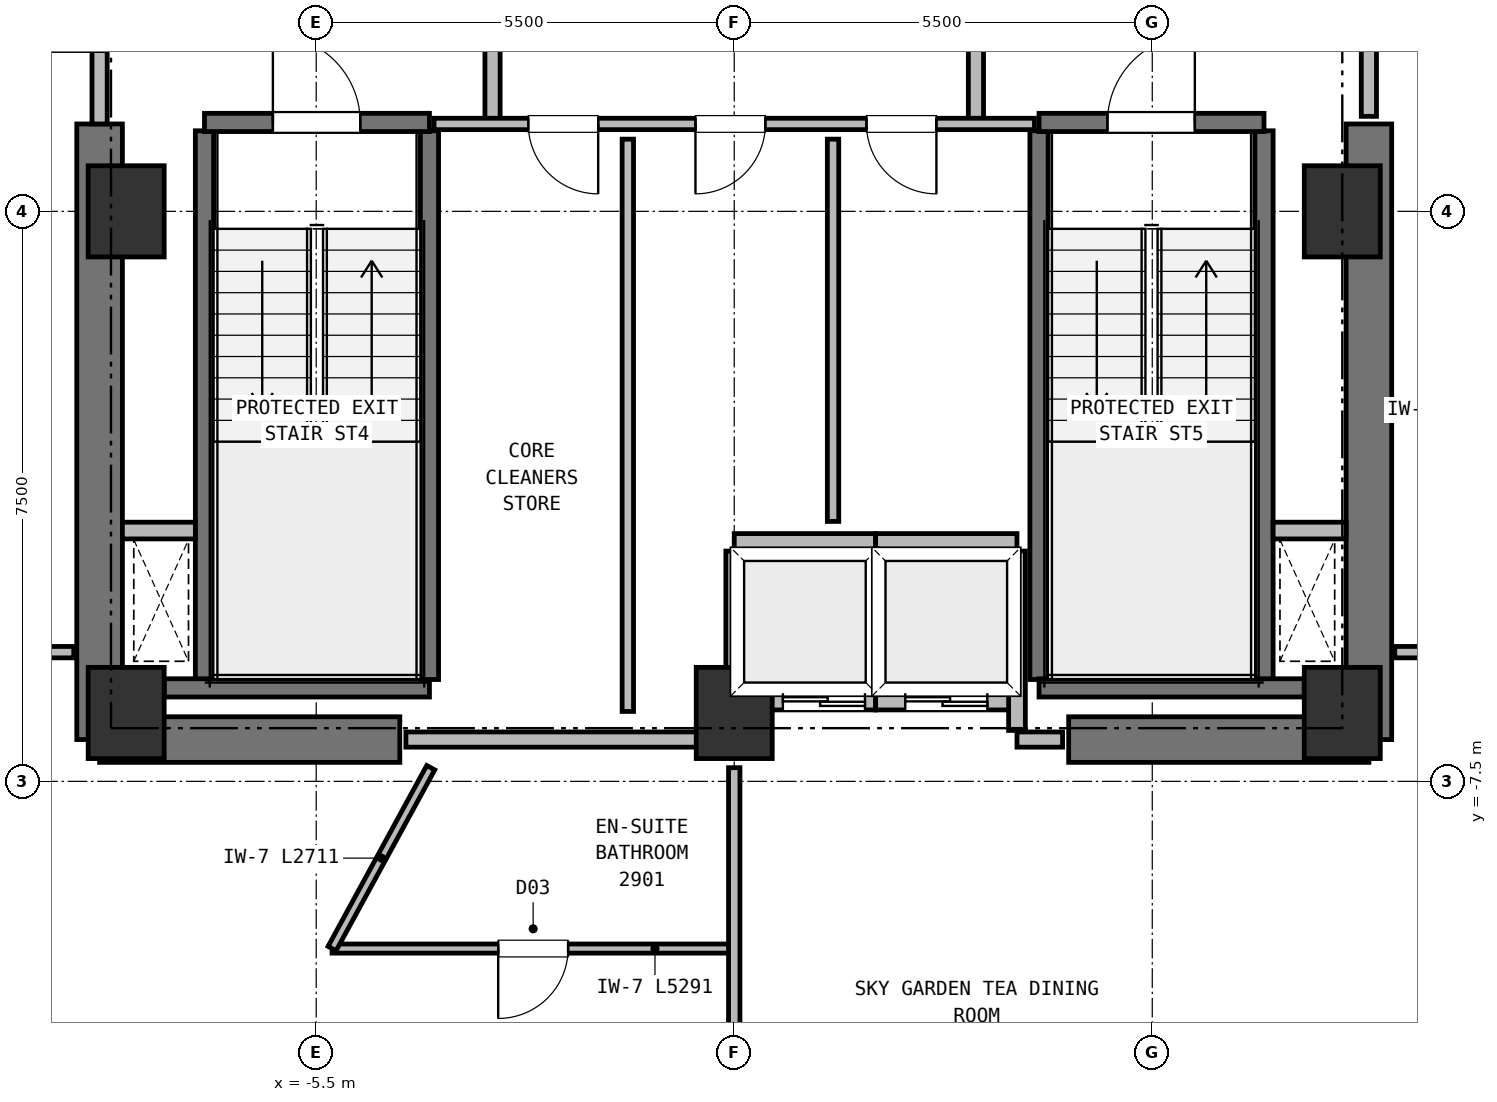
"""IFC4 building model, lengths in metres.
Left out: names, types, materials, properties, quantities, classifications, styles, units other than length and angle.
Written with IfcOpenShell. Run it as: python <this file> out.ifc"""

import sys

from ifc_helpers import new_model, si_unit, direction, frame, frame_2d, origin, origin_2d, place, context, subcontext, project, spatial, rectangle, extrude, element, fill, save


model = new_model("IFC4")
c1 = context("Model", 3, precision=1e-05, world=origin(), true_north=direction((0.0, 1.0)))
c2 = subcontext(c1, "Body", "Model", "MODEL_VIEW")
j1 = project(units=[si_unit("LENGTHUNIT", "METRE"), si_unit("PLANEANGLEUNIT", "RADIAN")], contexts=[c1])
p1 = place(None, origin())
s1 = spatial("IfcSite", under=j1, at=p1, CompositionType="ELEMENT")
p2 = place(p1, origin())
s2 = spatial("IfcBuilding", under=s1, at=p2, CompositionType="ELEMENT")
p3 = place(p2, frame((0.0, 0.0, 108.5)))
s3 = spatial("IfcBuildingStorey", under=s2, at=p3, CompositionType="ELEMENT", Elevation=108.5)
for number, where, z_axis, x_axis in (
    (1, (-8.0, -6.6, 0.0), (0.0, 0.0, 1.0), (1.0, 0.0, 0.0)),
    (2, (0.0, -6.6, 0.0), (0.0, 0.0, 1.0), (1.0, 0.0, 0.0)),
    (3, (8.0, -6.6, 0.0), (0.0, 0.0, 1.0), (1.0, 0.0, 0.0)),
    (4, (8.0, 0.0, 0.0), (0.0, 0.0, 1.0), (1.0, 0.0, 0.0)),
    (5, (-8.0, 0.0, 0.0), (0.0, 0.0, 1.0), (1.0, 0.0, 0.0)),
):
    element("IfcColumn", number, at=place(p3, frame(where, z_axis=z_axis, x_axis=x_axis)), inside=s3, PredefinedType="COLUMN", context=c2, shape_type="SweptSolid", body=[
        extrude(rectangle(XDim=1.0, YDim=1.2, at=origin_2d()), origin(), (0.0, 0.0, 1.0), 3.75),
    ])
for number, where, z_axis, x_axis in (
    (6, (-8.35, -6.95, 0.0), (0.0, 0.0, 1.0), (1.0, 0.0, 0.0)),
    (7, (4.4, -6.95, 0.0), (0.0, 0.0, 1.0), (1.0, 0.0, 0.0)),
):
    element("IfcWall", number, at=place(p3, frame(where, z_axis=z_axis, x_axis=x_axis)), inside=s3, PredefinedType="SHEAR", context=c2, shape_type="SweptSolid", body=[
        extrude(rectangle(XDim=3.95, YDim=0.6, at=frame_2d((1.975, 0.0))), origin(), (0.0, 0.0, 1.0), 3.5),
    ])
for number, where, z_axis, x_axis in (
    (8, (-8.35, -6.95, 0.0), (0.0, 0.0, 1.0), (0.0, 1.0, 0.0)),
    (9, (8.35, -6.95, 0.0), (0.0, 0.0, 1.0), (0.0, 1.0, 0.0)),
):
    element("IfcWall", number, at=place(p3, frame(where, z_axis=z_axis, x_axis=x_axis)), inside=s3, PredefinedType="SHEAR", context=c2, shape_type="SweptSolid", body=[
        extrude(rectangle(XDim=8.1, YDim=0.6, at=frame_2d((4.05, 0.0))), origin(), (0.0, 0.0, 1.0), 3.5),
    ])
p4 = place(p3, frame((11.178, -10.484, 0.0), z_axis=(0.0, 0.0, 1.0), x_axis=(-0.891006889171, -0.453989783419, 0.0)))
e10 = element("IfcWall", 10, at=p4, inside=s3, PredefinedType="SOLIDWALL", context=c2, shape_type="SweptSolid", body=[
    extrude(rectangle(XDim=10.4, YDim=0.36, at=frame_2d((5.2, 0.0))), origin(), (0.0, 0.0, 1.0), 3.15),
])
p5 = place(p4, frame((5.2, 0.0, 0.0)))
e11 = element("IfcOpeningElement", 11, at=p5, cuts=e10, PredefinedType="OPENING", context=c2, shape_type="SweptSolid", body=[
    extrude(rectangle(XDim=1.65, YDim=2.25, at=frame_2d((0.825, 1.125))), frame((0.0, 0.19, 0.0), z_axis=(0.0, -1.0, 0.0), x_axis=(1.0, 0.0, 0.0)), (0.0, 0.0, 1.0), 0.38),
])
p6 = place(p3, frame((-6.97, -6.16, 0.0), z_axis=(0.0, 0.0, 1.0), x_axis=(0.0, 1.0, 0.0)))
e12 = element("IfcWall", 12, at=p6, inside=s3, PredefinedType="SHEAR", context=c2, shape_type="SweptSolid", body=[
    extrude(rectangle(XDim=7.22, YDim=0.24, at=frame_2d((3.61, 0.0))), origin(), (0.0, 0.0, 1.0), 3.5),
])
p7 = place(p3, frame((-7.5, -6.27, 0.0), z_axis=(0.0, 0.0, 1.0), x_axis=(1.0, 0.0, 0.0)))
e13 = element("IfcWall", 13, at=p7, inside=s3, PredefinedType="SHEAR", context=c2, shape_type="SweptSolid", body=[
    extrude(rectangle(XDim=3.49, YDim=0.24, at=frame_2d((1.745, 0.0))), origin(), (0.0, 0.0, 1.0), 3.5),
])
p8 = place(p3, frame((-4.01, -6.16, 0.0), z_axis=(0.0, 0.0, 1.0), x_axis=(0.0, 1.0, 0.0)))
e14 = element("IfcWall", 14, at=p8, inside=s3, PredefinedType="SHEAR", context=c2, shape_type="SweptSolid", body=[
    extrude(rectangle(XDim=7.22, YDim=0.24, at=frame_2d((3.61, 0.0))), origin(), (0.0, 0.0, 1.0), 3.5),
])
p9 = place(p3, frame((-6.97, 1.17, 0.0), z_axis=(0.0, 0.0, 1.0), x_axis=(1.0, 0.0, 0.0)))
e15 = element("IfcWall", 15, at=p9, inside=s3, PredefinedType="SHEAR", context=c2, shape_type="SweptSolid", body=[
    extrude(rectangle(XDim=2.96, YDim=0.24, at=frame_2d((1.48, 0.0))), origin(), (0.0, 0.0, 1.0), 3.5),
])
p10 = place(p9, frame((0.9, 0.0, 0.0)))
e16 = element("IfcOpeningElement", 16, at=p10, cuts=e15, PredefinedType="OPENING", context=c2, shape_type="SweptSolid", body=[
    extrude(rectangle(XDim=1.15, YDim=2.15, at=frame_2d((0.575, 1.075))), frame((0.0, 0.13, 0.0), z_axis=(0.0, -1.0, 0.0), x_axis=(1.0, 0.0, 0.0)), (0.0, 0.0, 1.0), 0.26),
])
for number, where, z_axis, x_axis in (
    (17, (4.01, -6.16, 0.0), (0.0, 0.0, 1.0), (0.0, 1.0, 0.0)),
    (18, (6.97, -6.16, 0.0), (0.0, 0.0, 1.0), (0.0, 1.0, 0.0)),
):
    element("IfcWall", number, at=place(p3, frame(where, z_axis=z_axis, x_axis=x_axis)), inside=s3, PredefinedType="SHEAR", context=c2, shape_type="SweptSolid", body=[
        extrude(rectangle(XDim=7.22, YDim=0.24, at=frame_2d((3.61, 0.0))), origin(), (0.0, 0.0, 1.0), 3.5),
    ])
p11 = place(p3, frame((4.01, -6.27, 0.0), z_axis=(0.0, 0.0, 1.0), x_axis=(1.0, 0.0, 0.0)))
e19 = element("IfcWall", 19, at=p11, inside=s3, PredefinedType="SHEAR", context=c2, shape_type="SweptSolid", body=[
    extrude(rectangle(XDim=3.49, YDim=0.24, at=frame_2d((1.745, 0.0))), origin(), (0.0, 0.0, 1.0), 3.5),
])
p12 = place(p3, frame((4.01, 1.17, 0.0), z_axis=(0.0, 0.0, 1.0), x_axis=(1.0, 0.0, 0.0)))
e20 = element("IfcWall", 20, at=p12, inside=s3, PredefinedType="SHEAR", context=c2, shape_type="SweptSolid", body=[
    extrude(rectangle(XDim=2.96, YDim=0.24, at=frame_2d((1.48, 0.0))), origin(), (0.0, 0.0, 1.0), 3.5),
])
p13 = place(p12, frame((0.9, 0.0, 0.0)))
e21 = element("IfcOpeningElement", 21, at=p13, cuts=e20, PredefinedType="OPENING", context=c2, shape_type="SweptSolid", body=[
    extrude(rectangle(XDim=1.15, YDim=2.15, at=frame_2d((0.575, 1.075))), frame((0.0, 0.13, 0.0), z_axis=(0.0, -1.0, 0.0), x_axis=(1.0, 0.0, 0.0)), (0.0, 0.0, 1.0), 0.26),
])
for number, where, z_axis, x_axis in (
    (22, (-8.05, -4.2, 0.0), (0.0, 0.0, 1.0), (1.0, 0.0, 0.0)),
    (23, (7.09, -4.2, 0.0), (0.0, 0.0, 1.0), (1.0, 0.0, 0.0)),
):
    element("IfcWall", number, at=place(p3, frame(where, z_axis=z_axis, x_axis=x_axis)), inside=s3, PredefinedType="PARTITIONING", context=c2, shape_type="SweptSolid", body=[
        extrude(rectangle(XDim=0.96, YDim=0.22, at=frame_2d((0.48, 0.0))), origin(), (0.0, 0.0, 1.0), 3.5),
    ])
p14 = place(p3, frame((0.0, -6.45, 0.0), z_axis=(0.0, 0.0, 1.0), x_axis=(1.0, 0.0, 0.0)))
e24 = element("IfcWall", 24, at=p14, inside=s3, PredefinedType="PARTITIONING", context=c2, shape_type="SweptSolid", body=[
    extrude(rectangle(XDim=1.86, YDim=0.22, at=frame_2d((0.93, 0.0))), origin(), (0.0, 0.0, 1.0), 3.12),
])
p15 = place(p14, frame((0.64, 0.0, 0.0)))
e25 = element("IfcOpeningElement", 25, at=p15, cuts=e24, PredefinedType="OPENING", context=c2, shape_type="SweptSolid", body=[
    extrude(rectangle(XDim=1.08, YDim=2.15, at=frame_2d((0.54, 1.075))), frame((0.0, 0.12, 0.0), z_axis=(0.0, -1.0, 0.0), x_axis=(1.0, 0.0, 0.0)), (0.0, 0.0, 1.0), 0.24),
])
for number, where, z_axis, x_axis in (
    (26, (0.0, -4.35, 0.0), (0.0, 0.0, 1.0), (1.0, 0.0, 0.0)),
    (27, (0.0, -6.33, 0.0), (0.0, 0.0, 1.0), (0.0, 1.0, 0.0)),
    (28, (1.86, -6.33, 0.0), (0.0, 0.0, 1.0), (0.0, 1.0, 0.0)),
):
    element("IfcWall", number, at=place(p3, frame(where, z_axis=z_axis, x_axis=x_axis)), inside=s3, PredefinedType="PARTITIONING", context=c2, shape_type="SweptSolid", body=[
        extrude(rectangle(XDim=1.86, YDim=0.22, at=frame_2d((0.93, 0.0))), origin(), (0.0, 0.0, 1.0), 3.5),
    ])
p16 = place(p3, frame((1.86, -6.45, 0.0), z_axis=(0.0, 0.0, 1.0), x_axis=(1.0, 0.0, 0.0)))
e29 = element("IfcWall", 29, at=p16, inside=s3, PredefinedType="PARTITIONING", context=c2, shape_type="SweptSolid", body=[
    extrude(rectangle(XDim=1.86, YDim=0.22, at=frame_2d((0.93, 0.0))), origin(), (0.0, 0.0, 1.0), 3.12),
])
p17 = place(p16, frame((0.39, 0.0, 0.0)))
e30 = element("IfcOpeningElement", 30, at=p17, cuts=e29, PredefinedType="OPENING", context=c2, shape_type="SweptSolid", body=[
    extrude(rectangle(XDim=1.08, YDim=2.15, at=frame_2d((0.54, 1.075))), frame((0.0, 0.12, 0.0), z_axis=(0.0, -1.0, 0.0), x_axis=(1.0, 0.0, 0.0)), (0.0, 0.0, 1.0), 0.24),
])
p18 = place(p3, frame((1.86, -4.35, 0.0), z_axis=(0.0, 0.0, 1.0), x_axis=(1.0, 0.0, 0.0)))
e31 = element("IfcWall", 31, at=p18, inside=s3, PredefinedType="PARTITIONING", context=c2, shape_type="SweptSolid", body=[
    extrude(rectangle(XDim=1.86, YDim=0.22, at=frame_2d((0.93, 0.0))), origin(), (0.0, 0.0, 1.0), 3.5),
])
p19 = place(p3, frame((3.72, -6.83, 0.0), z_axis=(0.0, 0.0, 1.0), x_axis=(0.0, 1.0, 0.0)))
e32 = element("IfcWall", 32, at=p19, inside=s3, PredefinedType="PARTITIONING", context=c2, shape_type="SweptSolid", body=[
    extrude(rectangle(XDim=2.36, YDim=0.22, at=frame_2d((1.18, 0.0))), origin(), (0.0, 0.0, 1.0), 3.5),
])
p20 = place(p3, frame((-3.18, 1.15, 0.0), z_axis=(0.0, 0.0, 1.0), x_axis=(0.0, 1.0, 0.0)))
e33 = element("IfcWall", 33, at=p20, inside=s3, PredefinedType="PARTITIONING", context=c2, shape_type="SweptSolid", body=[
    extrude(rectangle(XDim=3.3, YDim=0.2, at=frame_2d((1.65, 0.0))), origin(), (0.0, 0.0, 1.0), 3.5),
])
p21 = place(p20, frame((1.08, 0.0, 0.0)))
e34 = element("IfcOpeningElement", 34, at=p21, cuts=e33, PredefinedType="OPENING", context=c2, shape_type="SweptSolid", body=[
    extrude(rectangle(XDim=1.15, YDim=2.15, at=frame_2d((0.575, 1.075))), frame((0.0, 0.11, 0.0), z_axis=(0.0, -1.0, 0.0), x_axis=(1.0, 0.0, 0.0)), (0.0, 0.0, 1.0), 0.22),
])
p22 = place(p3, frame((3.18, 1.15, 0.0), z_axis=(0.0, 0.0, 1.0), x_axis=(0.0, 1.0, 0.0)))
e35 = element("IfcWall", 35, at=p22, inside=s3, PredefinedType="PARTITIONING", context=c2, shape_type="SweptSolid", body=[
    extrude(rectangle(XDim=3.3, YDim=0.2, at=frame_2d((1.65, 0.0))), origin(), (0.0, 0.0, 1.0), 3.5),
])
p23 = place(p22, frame((1.08, 0.0, 0.0)))
e36 = element("IfcOpeningElement", 36, at=p23, cuts=e35, PredefinedType="OPENING", context=c2, shape_type="SweptSolid", body=[
    extrude(rectangle(XDim=1.15, YDim=2.15, at=frame_2d((0.575, 1.075))), frame((0.0, 0.11, 0.0), z_axis=(0.0, -1.0, 0.0), x_axis=(1.0, 0.0, 0.0)), (0.0, 0.0, 1.0), 0.22),
])
p24 = place(p3, frame((-8.35, 1.15, 0.0), z_axis=(0.0, 0.0, 1.0), x_axis=(0.0, 1.0, 0.0)))
e37 = element("IfcWall", 37, at=p24, inside=s3, PredefinedType="PARTITIONING", context=c2, shape_type="SweptSolid", body=[
    extrude(rectangle(XDim=5.4, YDim=0.2, at=frame_2d((2.7, 0.0))), origin(), (0.0, 0.0, 1.0), 3.5),
])
p25 = place(p24, frame((0.95, 0.0, 0.0)))
e38 = element("IfcOpeningElement", 38, at=p25, cuts=e37, PredefinedType="OPENING", context=c2, shape_type="SweptSolid", body=[
    extrude(rectangle(XDim=1.15, YDim=2.15, at=frame_2d((0.575, 1.075))), frame((0.0, 0.11, 0.0), z_axis=(0.0, -1.0, 0.0), x_axis=(1.0, 0.0, 0.0)), (0.0, 0.0, 1.0), 0.22),
])
p26 = place(p3, frame((8.35, 1.25, 0.0), z_axis=(0.0, 0.0, 1.0), x_axis=(0.0, 1.0, 0.0)))
e39 = element("IfcWall", 39, at=p26, inside=s3, PredefinedType="PARTITIONING", context=c2, shape_type="SweptSolid", body=[
    extrude(rectangle(XDim=5.3, YDim=0.2, at=frame_2d((2.65, 0.0))), origin(), (0.0, 0.0, 1.0), 3.5),
])
p27 = place(p26, frame((0.95, 0.0, 0.0)))
e40 = element("IfcOpeningElement", 40, at=p27, cuts=e39, PredefinedType="OPENING", context=c2, shape_type="SweptSolid", body=[
    extrude(rectangle(XDim=1.15, YDim=2.15, at=frame_2d((0.575, 1.075))), frame((0.0, 0.11, 0.0), z_axis=(0.0, -1.0, 0.0), x_axis=(1.0, 0.0, 0.0)), (0.0, 0.0, 1.0), 0.22),
])
p28 = place(p3, frame((3.95, 1.15, 0.0), z_axis=(0.0, 0.0, 1.0), x_axis=(-1.0, 0.0, 0.0)))
e41 = element("IfcWall", 41, at=p28, inside=s3, PredefinedType="PARTITIONING", context=c2, shape_type="SweptSolid", body=[
    extrude(rectangle(XDim=7.9, YDim=0.15, at=frame_2d((3.95, 0.0))), origin(), (0.0, 0.0, 1.0), 3.5),
])
p29 = place(p28, frame((5.74, 0.0, 0.0)))
e42 = element("IfcOpeningElement", 42, at=p29, cuts=e41, PredefinedType="OPENING", context=c2, shape_type="SweptSolid", body=[
    extrude(rectangle(XDim=0.92, YDim=2.05, at=frame_2d((0.46, 1.025))), frame((0.0, 0.085, 0.0), z_axis=(0.0, -1.0, 0.0), x_axis=(1.0, 0.0, 0.0)), (0.0, 0.0, 1.0), 0.17),
])
p30 = place(p28, frame((3.54, 0.0, 0.0)))
e43 = element("IfcOpeningElement", 43, at=p30, cuts=e41, PredefinedType="OPENING", context=c2, shape_type="SweptSolid", body=[
    extrude(rectangle(XDim=0.92, YDim=2.05, at=frame_2d((0.46, 1.025))), frame((0.0, 0.085, 0.0), z_axis=(0.0, -1.0, 0.0), x_axis=(1.0, 0.0, 0.0)), (0.0, 0.0, 1.0), 0.17),
])
p31 = place(p28, frame((1.29, 0.0, 0.0)))
e44 = element("IfcOpeningElement", 44, at=p31, cuts=e41, PredefinedType="OPENING", context=c2, shape_type="SweptSolid", body=[
    extrude(rectangle(XDim=0.92, YDim=2.05, at=frame_2d((0.46, 1.025))), frame((0.0, 0.085, 0.0), z_axis=(0.0, -1.0, 0.0), x_axis=(1.0, 0.0, 0.0)), (0.0, 0.0, 1.0), 0.17),
])
p32 = place(p3, frame((-4.32, -6.95, 0.0), z_axis=(0.0, 0.0, 1.0), x_axis=(1.0, 0.0, 0.0)))
e45 = element("IfcWall", 45, at=p32, inside=s3, PredefinedType="PARTITIONING", context=c2, shape_type="SweptSolid", body=[
    extrude(rectangle(XDim=4.32, YDim=0.2, at=frame_2d((2.16, 0.0))), origin(), (0.0, 0.0, 1.0), 3.5),
])
p33 = place(p3, frame((3.72, -6.95, 0.0), z_axis=(0.0, 0.0, 1.0), x_axis=(1.0, 0.0, 0.0)))
e46 = element("IfcWall", 46, at=p33, inside=s3, PredefinedType="PARTITIONING", context=c2, shape_type="SweptSolid", body=[
    extrude(rectangle(XDim=0.6, YDim=0.2, at=frame_2d((0.3, 0.0))), origin(), (0.0, 0.0, 1.0), 3.5),
])
p34 = place(p3, frame((-1.4, -6.58, 0.0), z_axis=(0.0, 0.0, 1.0), x_axis=(0.0, 1.0, 0.0)))
e47 = element("IfcWall", 47, at=p34, inside=s3, PredefinedType="PARTITIONING", context=c2, shape_type="SweptSolid", body=[
    extrude(rectangle(XDim=7.53, YDim=0.15, at=frame_2d((3.765, 0.0))), origin(), (0.0, 0.0, 1.0), 3.5),
])
p35 = place(p3, frame((1.3, -4.08, 0.0), z_axis=(0.0, 0.0, 1.0), x_axis=(0.0, 1.0, 0.0)))
e48 = element("IfcWall", 48, at=p35, inside=s3, PredefinedType="PARTITIONING", context=c2, shape_type="SweptSolid", body=[
    extrude(rectangle(XDim=5.03, YDim=0.15, at=frame_2d((2.515, 0.0))), origin(), (0.0, 0.0, 1.0), 3.5),
])
p36 = place(p3, frame((-8.69, -5.8, 0.0), z_axis=(0.0, 0.0, 1.0), x_axis=(-1.0, 0.0, 0.0)))
e49 = element("IfcWall", 49, at=p36, inside=s3, PredefinedType="PARTITIONING", context=c2, shape_type="SweptSolid", body=[
    extrude(rectangle(XDim=2.02, YDim=0.15, at=frame_2d((1.01, 0.0))), origin(), (0.0, 0.0, 1.0), 3.5),
])
p37 = place(p36, frame((0.52, 0.0, 0.0)))
e50 = element("IfcOpeningElement", 50, at=p37, cuts=e49, PredefinedType="OPENING", context=c2, shape_type="SweptSolid", body=[
    extrude(rectangle(XDim=1.06, YDim=2.15, at=frame_2d((0.53, 1.075))), frame((0.0, 0.085, 0.0), z_axis=(0.0, -1.0, 0.0), x_axis=(1.0, 0.0, 0.0)), (0.0, 0.0, 1.0), 0.17),
])
p38 = place(p3, frame((10.71, -5.8, 0.0), z_axis=(0.0, 0.0, 1.0), x_axis=(-1.0, 0.0, 0.0)))
e51 = element("IfcWall", 51, at=p38, inside=s3, PredefinedType="PARTITIONING", context=c2, shape_type="SweptSolid", body=[
    extrude(rectangle(XDim=2.02, YDim=0.15, at=frame_2d((1.01, 0.0))), origin(), (0.0, 0.0, 1.0), 3.5),
])
p39 = place(p38, frame((0.55, 0.0, 0.0)))
e52 = element("IfcOpeningElement", 52, at=p39, cuts=e51, PredefinedType="OPENING", context=c2, shape_type="SweptSolid", body=[
    extrude(rectangle(XDim=1.0, YDim=2.15, at=frame_2d((0.5, 1.075))), frame((0.0, 0.085, 0.0), z_axis=(0.0, -1.0, 0.0), x_axis=(1.0, 0.0, 0.0)), (0.0, 0.0, 1.0), 0.17),
])
p40 = place(p3, frame((0.0, -9.7, 0.0), z_axis=(0.0, 0.0, 1.0), x_axis=(-1.0, 0.0, 0.0)))
e53 = element("IfcWall", 53, at=p40, inside=s3, PredefinedType="PARTITIONING", context=c2, shape_type="SweptSolid", body=[
    extrude(rectangle(XDim=5.291, YDim=0.12, at=frame_2d((2.646, 0.0))), origin(), (0.0, 0.0, 1.0), 3.5),
])
p41 = place(p40, frame((2.186, 0.0, 0.0)))
e54 = element("IfcOpeningElement", 54, at=p41, cuts=e53, PredefinedType="OPENING", context=c2, shape_type="SweptSolid", body=[
    extrude(rectangle(XDim=0.92, YDim=2.1, at=frame_2d((0.46, 1.05))), frame((0.0, 0.07, 0.0), z_axis=(0.0, -1.0, 0.0), x_axis=(1.0, 0.0, 0.0)), (0.0, 0.0, 1.0), 0.14),
])
p42 = place(p3, frame((-5.291, -9.7, 0.0), z_axis=(0.0, 0.0, 1.0), x_axis=(0.478915225664, 0.877861154527, 0.0)))
e55 = element("IfcWall", 55, at=p42, inside=s3, PredefinedType="PARTITIONING", context=c2, shape_type="SweptSolid", body=[
    extrude(rectangle(XDim=2.711, YDim=0.12, at=frame_2d((1.355, 0.0))), origin(), (0.0, 0.0, 1.0), 3.5),
])
p43 = place(p3, frame((0.0, -7.32, 0.0), z_axis=(0.0, 0.0, 1.0), x_axis=(0.0, -1.0, 0.0)))
e56 = element("IfcWall", 56, at=p43, inside=s3, PredefinedType="PARTITIONING", context=c2, shape_type="SweptSolid", body=[
    extrude(rectangle(XDim=10.888, YDim=0.15, at=frame_2d((5.444, 0.0))), origin(), (0.0, 0.0, 1.0), 3.5),
])
p44 = place(p10, origin())
e57 = element("IfcDoor", 57, at=p44, inside=s3, OperationType="SINGLE_SWING_LEFT", PredefinedType="DOOR", context=c2, shape_type="SweptSolid", body=[
    extrude(rectangle(XDim=1.15, YDim=2.15, at=frame_2d((0.575, 1.075))), frame((0.0, 0.025, 0.0), z_axis=(0.0, -1.0, 0.0), x_axis=(1.0, 0.0, 0.0)), (0.0, 0.0, 1.0), 0.05),
])
fill(e16, e57)
p45 = place(p13, origin())
e58 = element("IfcDoor", 58, at=p45, inside=s3, OperationType="SINGLE_SWING_RIGHT", PredefinedType="DOOR", context=c2, shape_type="SweptSolid", body=[
    extrude(rectangle(XDim=1.15, YDim=2.15, at=frame_2d((0.575, 1.075))), frame((0.0, 0.025, 0.0), z_axis=(0.0, -1.0, 0.0), x_axis=(1.0, 0.0, 0.0)), (0.0, 0.0, 1.0), 0.05),
])
fill(e21, e58)
p46 = place(p15, origin())
e59 = element("IfcDoor", 59, at=p46, inside=s3, OperationType="DOUBLE_DOOR_SLIDING", PredefinedType="DOOR", context=c2, shape_type="SweptSolid", body=[
    extrude(rectangle(XDim=1.08, YDim=2.15, at=frame_2d((0.54, 1.075))), frame((0.0, 0.025, 0.0), z_axis=(0.0, -1.0, 0.0), x_axis=(1.0, 0.0, 0.0)), (0.0, 0.0, 1.0), 0.05),
])
fill(e25, e59)
p47 = place(p17, origin())
e60 = element("IfcDoor", 60, at=p47, inside=s3, OperationType="DOUBLE_DOOR_SLIDING", PredefinedType="DOOR", context=c2, shape_type="SweptSolid", body=[
    extrude(rectangle(XDim=1.08, YDim=2.15, at=frame_2d((0.54, 1.075))), frame((0.0, 0.025, 0.0), z_axis=(0.0, -1.0, 0.0), x_axis=(1.0, 0.0, 0.0)), (0.0, 0.0, 1.0), 0.05),
])
fill(e30, e60)
p48 = place(p25, origin())
e61 = element("IfcDoor", 61, at=p48, inside=s3, OperationType="SINGLE_SWING_LEFT", PredefinedType="DOOR", context=c2, shape_type="SweptSolid", body=[
    extrude(rectangle(XDim=1.15, YDim=2.15, at=frame_2d((0.575, 1.075))), frame((0.0, 0.025, 0.0), z_axis=(0.0, -1.0, 0.0), x_axis=(1.0, 0.0, 0.0)), (0.0, 0.0, 1.0), 0.05),
])
fill(e38, e61)
p49 = place(p29, origin())
e62 = element("IfcDoor", 62, at=p49, inside=s3, OperationType="SINGLE_SWING_LEFT", PredefinedType="DOOR", context=c2, shape_type="SweptSolid", body=[
    extrude(rectangle(XDim=0.92, YDim=2.05, at=frame_2d((0.46, 1.025))), frame((0.0, 0.025, 0.0), z_axis=(0.0, -1.0, 0.0), x_axis=(1.0, 0.0, 0.0)), (0.0, 0.0, 1.0), 0.05),
])
fill(e42, e62)
p50 = place(p30, origin())
e63 = element("IfcDoor", 63, at=p50, inside=s3, OperationType="SINGLE_SWING_RIGHT", PredefinedType="DOOR", context=c2, shape_type="SweptSolid", body=[
    extrude(rectangle(XDim=0.92, YDim=2.05, at=frame_2d((0.46, 1.025))), frame((0.0, 0.025, 0.0), z_axis=(0.0, -1.0, 0.0), x_axis=(1.0, 0.0, 0.0)), (0.0, 0.0, 1.0), 0.05),
])
fill(e43, e63)
p51 = place(p31, origin())
e64 = element("IfcDoor", 64, at=p51, inside=s3, OperationType="SINGLE_SWING_LEFT", PredefinedType="DOOR", context=c2, shape_type="SweptSolid", body=[
    extrude(rectangle(XDim=0.92, YDim=2.05, at=frame_2d((0.46, 1.025))), frame((0.0, 0.025, 0.0), z_axis=(0.0, -1.0, 0.0), x_axis=(1.0, 0.0, 0.0)), (0.0, 0.0, 1.0), 0.05),
])
fill(e44, e64)
p52 = place(p41, origin())
e65 = element("IfcDoor", 65, at=p52, inside=s3, OperationType="SINGLE_SWING_RIGHT", PredefinedType="DOOR", context=c2, shape_type="SweptSolid", body=[
    extrude(rectangle(XDim=0.92, YDim=2.1, at=frame_2d((0.46, 1.05))), frame((0.0, 0.025, 0.0), z_axis=(0.0, -1.0, 0.0), x_axis=(1.0, 0.0, 0.0)), (0.0, 0.0, 1.0), 0.05),
])
fill(e54, e65)
save(model, sys.argv[1])
